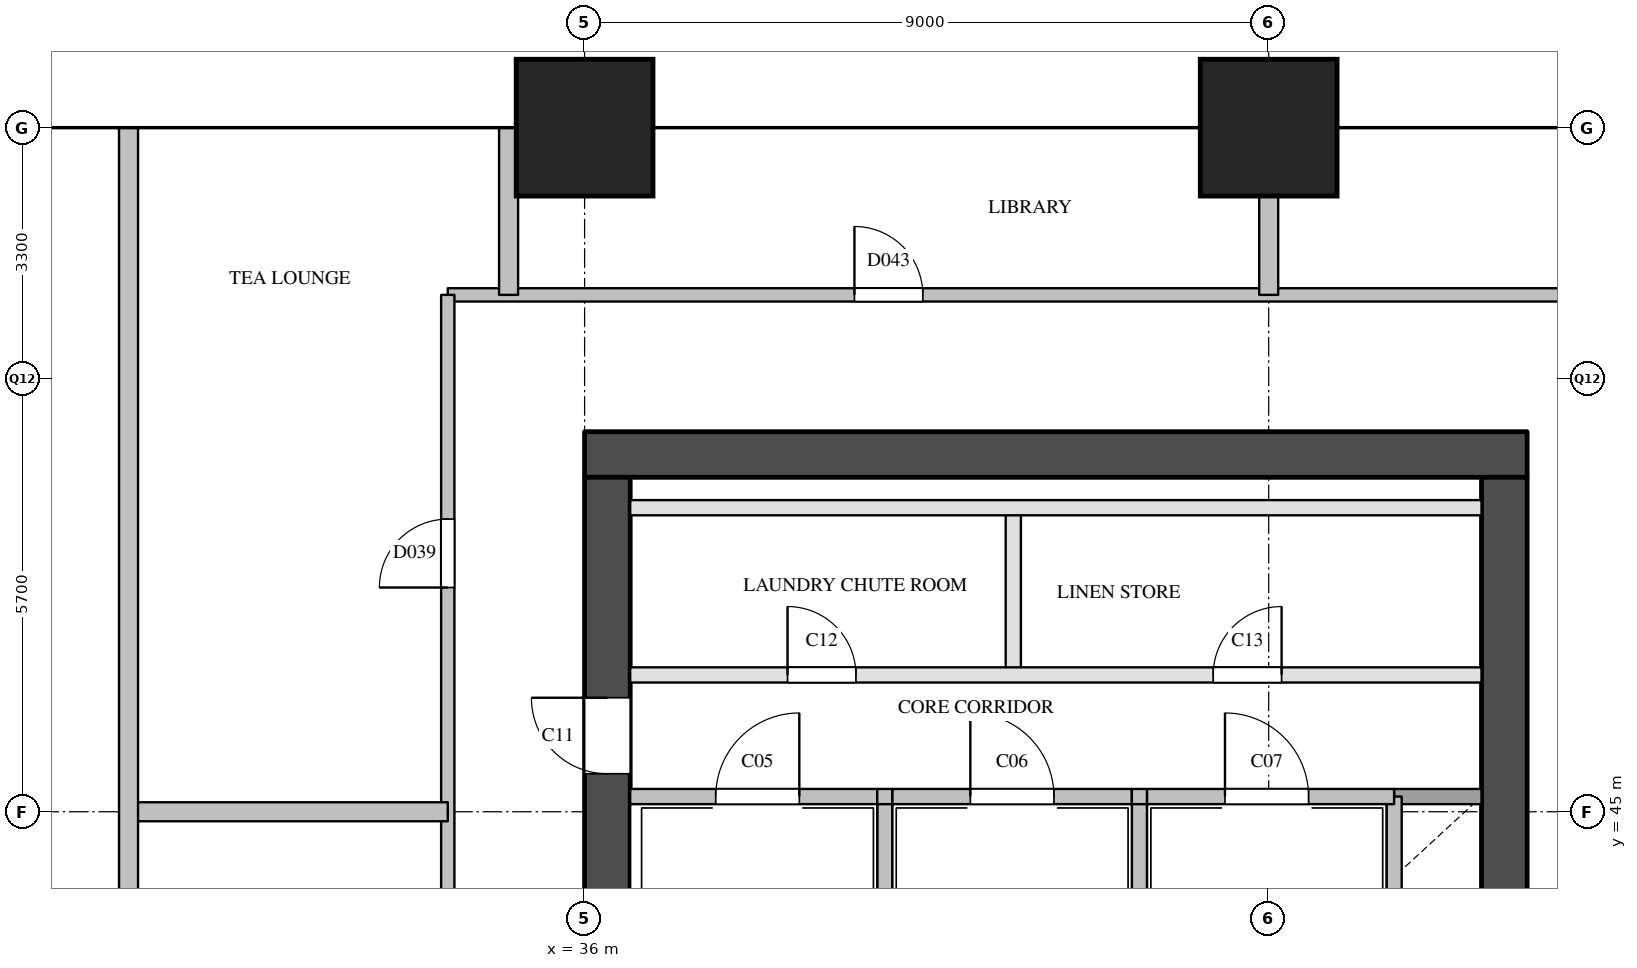
"""IFC4 building model, lengths in metres.
Left out: names, types, materials, properties, quantities, classifications, styles, units other than length and angle.
Written with IfcOpenShell. Run it as: python <this file> out.ifc"""

import sys

from ifc_helpers import new_model, si_unit, direction, frame, frame_2d, origin, origin_2d, place, context, subcontext, project, spatial, rectangle, extrude, element, fill, save


model = new_model("IFC4")
c1 = context("Model", 3, precision=1e-05, world=origin(), true_north=direction((0.0, 1.0)))
c2 = subcontext(c1, "Body", "Model", "MODEL_VIEW")
j1 = project(units=[si_unit("LENGTHUNIT", "METRE"), si_unit("PLANEANGLEUNIT", "RADIAN")], contexts=[c1])
p1 = place(None, origin())
s1 = spatial("IfcSite", under=j1, at=p1, CompositionType="ELEMENT")
p2 = place(p1, origin())
s2 = spatial("IfcBuilding", under=s1, at=p2, CompositionType="ELEMENT")
p3 = place(p2, frame((0.0, 0.0, 72.8)))
s3 = spatial("IfcBuildingStorey", under=s2, at=p3, CompositionType="ELEMENT", Elevation=72.8)
for number, where, z_axis, x_axis in (
    (1, (36.0, 54.0, 0.0), (0.0, 0.0, 1.0), (1.0, 0.0, 0.0)),
    (2, (45.0, 54.0, 0.0), (0.0, 0.0, 1.0), (1.0, 0.0, 0.0)),
):
    element("IfcColumn", number, at=place(p3, frame(where, z_axis=z_axis, x_axis=x_axis)), inside=s3, PredefinedType="COLUMN", context=c2, shape_type="SweptSolid", body=[
        extrude(rectangle(XDim=1.8, YDim=1.8, at=origin_2d()), origin(), (0.0, 0.0, 1.0), 5.0),
    ])
p4 = place(p3, frame((36.0, 49.7, 0.0), z_axis=(0.0, 0.0, 1.0), x_axis=(1.0, 0.0, 0.0)))
e3 = element("IfcWall", 3, at=p4, inside=s3, PredefinedType="SHEAR", context=c2, shape_type="SweptSolid", body=[
    extrude(rectangle(XDim=12.4, YDim=0.6, at=frame_2d((6.2, 0.0))), origin(), (0.0, 0.0, 1.0), 4.7),
])
p5 = place(p3, frame((36.3, 29.1, 0.0), z_axis=(0.0, 0.0, 1.0), x_axis=(0.0, 1.0, 0.0)))
e4 = element("IfcWall", 4, at=p5, inside=s3, PredefinedType="SHEAR", context=c2, shape_type="SweptSolid", body=[
    extrude(rectangle(XDim=20.3, YDim=0.6, at=frame_2d((10.15, 0.0))), origin(), (0.0, 0.0, 1.0), 4.7),
])
p6 = place(p5, frame((3.6, 0.0, 0.0)))
e5 = element("IfcOpeningElement", 5, at=p6, cuts=e4, PredefinedType="OPENING", context=c2, shape_type="SweptSolid", body=[
    extrude(rectangle(XDim=1.8, YDim=2.1, at=frame_2d((0.9, 1.05))), frame((0.0, 0.31, 0.0), z_axis=(0.0, -1.0, 0.0), x_axis=(1.0, 0.0, 0.0)), (0.0, 0.0, 1.0), 0.62),
])
p7 = place(p5, frame((16.4, 0.0, 0.0)))
e6 = element("IfcOpeningElement", 6, at=p7, cuts=e4, PredefinedType="OPENING", context=c2, shape_type="SweptSolid", body=[
    extrude(rectangle(XDim=1.0, YDim=2.1, at=frame_2d((0.5, 1.05))), frame((0.0, 0.31, 0.0), z_axis=(0.0, -1.0, 0.0), x_axis=(1.0, 0.0, 0.0)), (0.0, 0.0, 1.0), 0.62),
])
p8 = place(p3, frame((48.1, 29.1, 0.0), z_axis=(0.0, 0.0, 1.0), x_axis=(0.0, 1.0, 0.0)))
e7 = element("IfcWall", 7, at=p8, inside=s3, PredefinedType="SHEAR", context=c2, shape_type="SweptSolid", body=[
    extrude(rectangle(XDim=20.3, YDim=0.6, at=frame_2d((10.15, 0.0))), origin(), (0.0, 0.0, 1.0), 4.7),
])
p9 = place(p8, frame((12.5, 0.0, 0.0)))
e8 = element("IfcOpeningElement", 8, at=p9, cuts=e7, PredefinedType="OPENING", context=c2, shape_type="SweptSolid", body=[
    extrude(rectangle(XDim=0.7, YDim=2.1, at=frame_2d((0.35, 1.05))), frame((0.0, 0.31, 0.0), z_axis=(0.0, -1.0, 0.0), x_axis=(1.0, 0.0, 0.0)), (0.0, 0.0, 1.0), 0.62),
])
p10 = place(p8, frame((3.9, 0.0, 0.0)))
e9 = element("IfcOpeningElement", 9, at=p10, cuts=e7, PredefinedType="OPENING", context=c2, shape_type="SweptSolid", body=[
    extrude(rectangle(XDim=1.8, YDim=2.1, at=frame_2d((0.9, 1.05))), frame((0.0, 0.31, 0.0), z_axis=(0.0, -1.0, 0.0), x_axis=(1.0, 0.0, 0.0)), (0.0, 0.0, 1.0), 0.62),
])
p11 = place(p3, frame((39.95, 43.58, 0.0), z_axis=(0.0, 0.0, 1.0), x_axis=(0.0, 1.0, 0.0)))
e10 = element("IfcWall", 10, at=p11, inside=s3, PredefinedType="SOLIDWALL", context=c2, shape_type="SweptSolid", body=[
    extrude(rectangle(XDim=1.62, YDim=0.2, at=frame_2d((0.81, 0.0))), origin(), (0.0, 0.0, 1.0), 4.7),
])
p12 = place(p3, frame((41.64, 46.8, 0.0), z_axis=(0.0, 0.0, 1.0), x_axis=(0.0, 1.0, 0.0)))
e11 = element("IfcWall", 11, at=p12, inside=s3, PredefinedType="PARTITIONING", context=c2, shape_type="SweptSolid", body=[
    extrude(rectangle(XDim=2.2, YDim=0.2, at=frame_2d((1.1, 0.0))), origin(), (0.0, 0.0, 1.0), 4.7),
])
for number, where, z_axis, x_axis in (
    (12, (43.3, 43.58, 0.0), (0.0, 0.0, 1.0), (0.0, 1.0, 0.0)),
    (13, (46.65, 43.58, 0.0), (0.0, 0.0, 1.0), (0.0, 1.0, 0.0)),
):
    element("IfcWall", number, at=place(p3, frame(where, z_axis=z_axis, x_axis=x_axis)), inside=s3, PredefinedType="SOLIDWALL", context=c2, shape_type="SweptSolid", body=[
        extrude(rectangle(XDim=1.62, YDim=0.2, at=frame_2d((0.81, 0.0))), origin(), (0.0, 0.0, 1.0), 4.7),
    ])
p13 = place(p3, frame((46.65, 45.2, 0.0), z_axis=(0.0, 0.0, 1.0), x_axis=(1.0, 0.0, 0.0)))
e14 = element("IfcWall", 14, at=p13, inside=s3, PredefinedType="SOLIDWALL", context=c2, shape_type="SweptSolid", body=[
    extrude(rectangle(XDim=1.15, YDim=0.2, at=frame_2d((0.575, 0.0))), origin(), (0.0, 0.0, 1.0), 4.7),
])
p14 = place(p3, frame((36.6, 45.2, 0.0), z_axis=(0.0, 0.0, 1.0), x_axis=(1.0, 0.0, 0.0)))
e15 = element("IfcWall", 15, at=p14, inside=s3, PredefinedType="SOLIDWALL", context=c2, shape_type="SweptSolid", body=[
    extrude(rectangle(XDim=3.25, YDim=0.2, at=frame_2d((1.625, 0.0))), origin(), (0.0, 0.0, 1.0), 4.7),
])
p15 = place(p14, frame((1.125, 0.0, 0.0)))
e16 = element("IfcOpeningElement", 16, at=p15, cuts=e15, PredefinedType="OPENING", context=c2, shape_type="SweptSolid", body=[
    extrude(rectangle(XDim=1.1, YDim=2.1, at=frame_2d((0.55, 1.05))), frame((0.0, 0.11, 0.0), z_axis=(0.0, -1.0, 0.0), x_axis=(1.0, 0.0, 0.0)), (0.0, 0.0, 1.0), 0.22),
])
p16 = place(p3, frame((39.85, 45.2, 0.0), z_axis=(0.0, 0.0, 1.0), x_axis=(1.0, 0.0, 0.0)))
e17 = element("IfcWall", 17, at=p16, inside=s3, PredefinedType="SOLIDWALL", context=c2, shape_type="SweptSolid", body=[
    extrude(rectangle(XDim=0.2, YDim=0.2, at=frame_2d((0.1, 0.0))), origin(), (0.0, 0.0, 1.0), 4.7),
])
p17 = place(p3, frame((40.05, 45.2, 0.0), z_axis=(0.0, 0.0, 1.0), x_axis=(1.0, 0.0, 0.0)))
e18 = element("IfcWall", 18, at=p17, inside=s3, PredefinedType="SOLIDWALL", context=c2, shape_type="SweptSolid", body=[
    extrude(rectangle(XDim=3.15, YDim=0.2, at=frame_2d((1.575, 0.0))), origin(), (0.0, 0.0, 1.0), 4.7),
])
p18 = place(p17, frame((1.025, 0.0, 0.0)))
e19 = element("IfcOpeningElement", 19, at=p18, cuts=e18, PredefinedType="OPENING", context=c2, shape_type="SweptSolid", body=[
    extrude(rectangle(XDim=1.1, YDim=2.1, at=frame_2d((0.55, 1.05))), frame((0.0, 0.11, 0.0), z_axis=(0.0, -1.0, 0.0), x_axis=(1.0, 0.0, 0.0)), (0.0, 0.0, 1.0), 0.22),
])
p19 = place(p3, frame((43.2, 45.2, 0.0), z_axis=(0.0, 0.0, 1.0), x_axis=(1.0, 0.0, 0.0)))
e20 = element("IfcWall", 20, at=p19, inside=s3, PredefinedType="SOLIDWALL", context=c2, shape_type="SweptSolid", body=[
    extrude(rectangle(XDim=0.2, YDim=0.2, at=frame_2d((0.1, 0.0))), origin(), (0.0, 0.0, 1.0), 4.7),
])
p20 = place(p3, frame((43.4, 45.2, 0.0), z_axis=(0.0, 0.0, 1.0), x_axis=(1.0, 0.0, 0.0)))
e21 = element("IfcWall", 21, at=p20, inside=s3, PredefinedType="SOLIDWALL", context=c2, shape_type="SweptSolid", body=[
    extrude(rectangle(XDim=3.25, YDim=0.2, at=frame_2d((1.625, 0.0))), origin(), (0.0, 0.0, 1.0), 4.7),
])
p21 = place(p20, frame((1.025, 0.0, 0.0)))
e22 = element("IfcOpeningElement", 22, at=p21, cuts=e21, PredefinedType="OPENING", context=c2, shape_type="SweptSolid", body=[
    extrude(rectangle(XDim=1.1, YDim=2.1, at=frame_2d((0.55, 1.05))), frame((0.0, 0.11, 0.0), z_axis=(0.0, -1.0, 0.0), x_axis=(1.0, 0.0, 0.0)), (0.0, 0.0, 1.0), 0.22),
])
p22 = place(p3, frame((36.6, 46.8, 0.0), z_axis=(0.0, 0.0, 1.0), x_axis=(1.0, 0.0, 0.0)))
e23 = element("IfcWall", 23, at=p22, inside=s3, PredefinedType="PARTITIONING", context=c2, shape_type="SweptSolid", body=[
    extrude(rectangle(XDim=11.2, YDim=0.2, at=frame_2d((5.6, 0.0))), origin(), (0.0, 0.0, 1.0), 4.7),
])
p23 = place(p22, frame((2.07, 0.0, 0.0)))
e24 = element("IfcOpeningElement", 24, at=p23, cuts=e23, PredefinedType="OPENING", context=c2, shape_type="SweptSolid", body=[
    extrude(rectangle(XDim=0.9, YDim=2.1, at=frame_2d((0.45, 1.05))), frame((0.0, 0.11, 0.0), z_axis=(0.0, -1.0, 0.0), x_axis=(1.0, 0.0, 0.0)), (0.0, 0.0, 1.0), 0.22),
])
p24 = place(p22, frame((7.67, 0.0, 0.0)))
e25 = element("IfcOpeningElement", 25, at=p24, cuts=e23, PredefinedType="OPENING", context=c2, shape_type="SweptSolid", body=[
    extrude(rectangle(XDim=0.9, YDim=2.1, at=frame_2d((0.45, 1.05))), frame((0.0, 0.11, 0.0), z_axis=(0.0, -1.0, 0.0), x_axis=(1.0, 0.0, 0.0)), (0.0, 0.0, 1.0), 0.22),
])
p25 = place(p3, frame((36.6, 49.0, 0.0), z_axis=(0.0, 0.0, 1.0), x_axis=(1.0, 0.0, 0.0)))
e26 = element("IfcWall", 26, at=p25, inside=s3, PredefinedType="PARTITIONING", context=c2, shape_type="SweptSolid", body=[
    extrude(rectangle(XDim=11.2, YDim=0.2, at=frame_2d((5.6, 0.0))), origin(), (0.0, 0.0, 1.0), 4.7),
])
p26 = place(p3, frame((34.2, 51.8, 0.0), z_axis=(0.0, 0.0, 1.0), x_axis=(1.0, 0.0, 0.0)))
e27 = element("IfcWall", 27, at=p26, inside=s3, PredefinedType="PARTITIONING", context=c2, shape_type="SweptSolid", body=[
    extrude(rectangle(XDim=16.0, YDim=0.175, at=frame_2d((8.0, 0.0))), origin(), (0.0, 0.0, 1.0), 4.7),
])
p27 = place(p26, frame((5.35, 0.0, 0.0)))
e28 = element("IfcOpeningElement", 28, at=p27, cuts=e27, PredefinedType="OPENING", context=c2, shape_type="SweptSolid", body=[
    extrude(rectangle(XDim=0.9, YDim=2.1, at=frame_2d((0.45, 1.05))), frame((0.0, 0.097, 0.0), z_axis=(0.0, -1.0, 0.0), x_axis=(1.0, 0.0, 0.0)), (0.0, 0.0, 1.0), 0.195),
])
p28 = place(p3, frame((34.2, 29.12, 0.0), z_axis=(0.0, 0.0, 1.0), x_axis=(0.0, 1.0, 0.0)))
e29 = element("IfcWall", 29, at=p28, inside=s3, PredefinedType="PARTITIONING", context=c2, shape_type="SweptSolid", body=[
    extrude(rectangle(XDim=22.68, YDim=0.175, at=frame_2d((11.34, 0.0))), origin(), (0.0, 0.0, 1.0), 4.7),
])
p29 = place(p28, frame((2.44, 0.0, 0.0)))
e30 = element("IfcOpeningElement", 30, at=p29, cuts=e29, PredefinedType="OPENING", context=c2, shape_type="SweptSolid", body=[
    extrude(rectangle(XDim=1.0, YDim=2.1, at=frame_2d((0.5, 1.05))), frame((0.0, 0.097, 0.0), z_axis=(0.0, -1.0, 0.0), x_axis=(1.0, 0.0, 0.0)), (0.0, 0.0, 1.0), 0.195),
])
p30 = place(p28, frame((10.43, 0.0, 0.0)))
e31 = element("IfcOpeningElement", 31, at=p30, cuts=e29, PredefinedType="OPENING", context=c2, shape_type="SweptSolid", body=[
    extrude(rectangle(XDim=0.9, YDim=2.1, at=frame_2d((0.45, 1.05))), frame((0.0, 0.097, 0.0), z_axis=(0.0, -1.0, 0.0), x_axis=(1.0, 0.0, 0.0)), (0.0, 0.0, 1.0), 0.195),
])
p31 = place(p28, frame((18.83, 0.0, 0.0)))
e32 = element("IfcOpeningElement", 32, at=p31, cuts=e29, PredefinedType="OPENING", context=c2, shape_type="SweptSolid", body=[
    extrude(rectangle(XDim=0.9, YDim=2.1, at=frame_2d((0.45, 1.05))), frame((0.0, 0.097, 0.0), z_axis=(0.0, -1.0, 0.0), x_axis=(1.0, 0.0, 0.0)), (0.0, 0.0, 1.0), 0.195),
])
p32 = place(p3, frame((30.0, 45.0, 0.0), z_axis=(0.0, 0.0, 1.0), x_axis=(1.0, 0.0, 0.0)))
e33 = element("IfcWall", 33, at=p32, inside=s3, PredefinedType="PARTITIONING", context=c2, shape_type="SweptSolid", body=[
    extrude(rectangle(XDim=4.2, YDim=0.25, at=frame_2d((2.1, 0.0))), origin(), (0.0, 0.0, 1.0), 4.7),
])
p33 = place(p3, frame((30.0, 35.0, 0.0), z_axis=(0.0, 0.0, 1.0), x_axis=(0.0, 1.0, 0.0)))
e34 = element("IfcWall", 34, at=p33, inside=s3, PredefinedType="PARTITIONING", context=c2, shape_type="SweptSolid", body=[
    extrude(rectangle(XDim=19.0, YDim=0.25, at=frame_2d((9.5, 0.0))), origin(), (0.0, 0.0, 1.0), 3.7),
])
p34 = place(p3, frame((35.0, 51.8, 0.0), z_axis=(0.0, 0.0, 1.0), x_axis=(0.0, 1.0, 0.0)))
e35 = element("IfcWall", 35, at=p34, inside=s3, PredefinedType="PARTITIONING", context=c2, shape_type="SweptSolid", body=[
    extrude(rectangle(XDim=2.2, YDim=0.25, at=frame_2d((1.1, 0.0))), origin(), (0.0, 0.0, 1.0), 3.7),
])
p35 = place(p3, frame((45.0, 51.8, 0.0), z_axis=(0.0, 0.0, 1.0), x_axis=(0.0, 1.0, 0.0)))
e36 = element("IfcWall", 36, at=p35, inside=s3, PredefinedType="PARTITIONING", context=c2, shape_type="SweptSolid", body=[
    extrude(rectangle(XDim=2.2, YDim=0.25, at=frame_2d((1.1, 0.0))), origin(), (0.0, 0.0, 1.0), 4.7),
])
p36 = place(p15, origin())
e37 = element("IfcDoor", 37, at=p36, inside=s3, OperationType="SINGLE_SWING_RIGHT", PredefinedType="DOOR", context=c2, shape_type="SweptSolid", body=[
    extrude(rectangle(XDim=1.1, YDim=2.1, at=frame_2d((0.55, 1.05))), frame((0.0, 0.025, 0.0), z_axis=(0.0, -1.0, 0.0), x_axis=(1.0, 0.0, 0.0)), (0.0, 0.0, 1.0), 0.05),
])
fill(e16, e37)
p37 = place(p18, origin())
e38 = element("IfcDoor", 38, at=p37, inside=s3, OperationType="SINGLE_SWING_LEFT", PredefinedType="DOOR", context=c2, shape_type="SweptSolid", body=[
    extrude(rectangle(XDim=1.1, YDim=2.1, at=frame_2d((0.55, 1.05))), frame((0.0, 0.025, 0.0), z_axis=(0.0, -1.0, 0.0), x_axis=(1.0, 0.0, 0.0)), (0.0, 0.0, 1.0), 0.05),
])
fill(e19, e38)
p38 = place(p21, origin())
e39 = element("IfcDoor", 39, at=p38, inside=s3, OperationType="SINGLE_SWING_LEFT", PredefinedType="DOOR", context=c2, shape_type="SweptSolid", body=[
    extrude(rectangle(XDim=1.1, YDim=2.1, at=frame_2d((0.55, 1.05))), frame((0.0, 0.025, 0.0), z_axis=(0.0, -1.0, 0.0), x_axis=(1.0, 0.0, 0.0)), (0.0, 0.0, 1.0), 0.05),
])
fill(e22, e39)
p39 = place(p7, origin())
e40 = element("IfcDoor", 40, at=p39, inside=s3, OperationType="SINGLE_SWING_RIGHT", PredefinedType="DOOR", context=c2, shape_type="SweptSolid", body=[
    extrude(rectangle(XDim=1.0, YDim=2.1, at=frame_2d((0.5, 1.05))), frame((0.0, 0.025, 0.0), z_axis=(0.0, -1.0, 0.0), x_axis=(1.0, 0.0, 0.0)), (0.0, 0.0, 1.0), 0.05),
])
fill(e6, e40)
p40 = place(p23, origin())
e41 = element("IfcDoor", 41, at=p40, inside=s3, OperationType="SINGLE_SWING_LEFT", PredefinedType="DOOR", context=c2, shape_type="SweptSolid", body=[
    extrude(rectangle(XDim=0.9, YDim=2.1, at=frame_2d((0.45, 1.05))), frame((0.0, 0.025, 0.0), z_axis=(0.0, -1.0, 0.0), x_axis=(1.0, 0.0, 0.0)), (0.0, 0.0, 1.0), 0.05),
])
fill(e24, e41)
p41 = place(p24, origin())
e42 = element("IfcDoor", 42, at=p41, inside=s3, OperationType="SINGLE_SWING_RIGHT", PredefinedType="DOOR", context=c2, shape_type="SweptSolid", body=[
    extrude(rectangle(XDim=0.9, YDim=2.1, at=frame_2d((0.45, 1.05))), frame((0.0, 0.025, 0.0), z_axis=(0.0, -1.0, 0.0), x_axis=(1.0, 0.0, 0.0)), (0.0, 0.0, 1.0), 0.05),
])
fill(e25, e42)
p42 = place(p31, origin())
e43 = element("IfcDoor", 43, at=p42, inside=s3, OperationType="SINGLE_SWING_LEFT", PredefinedType="DOOR", context=c2, shape_type="SweptSolid", body=[
    extrude(rectangle(XDim=0.9, YDim=2.1, at=frame_2d((0.45, 1.05))), frame((0.0, 0.025, 0.0), z_axis=(0.0, -1.0, 0.0), x_axis=(1.0, 0.0, 0.0)), (0.0, 0.0, 1.0), 0.05),
])
fill(e32, e43)
p43 = place(p27, origin())
e44 = element("IfcDoor", 44, at=p43, inside=s3, OperationType="SINGLE_SWING_LEFT", PredefinedType="DOOR", context=c2, shape_type="SweptSolid", body=[
    extrude(rectangle(XDim=0.9, YDim=2.1, at=frame_2d((0.45, 1.05))), frame((0.0, 0.025, 0.0), z_axis=(0.0, -1.0, 0.0), x_axis=(1.0, 0.0, 0.0)), (0.0, 0.0, 1.0), 0.05),
])
fill(e28, e44)
save(model, sys.argv[1])
